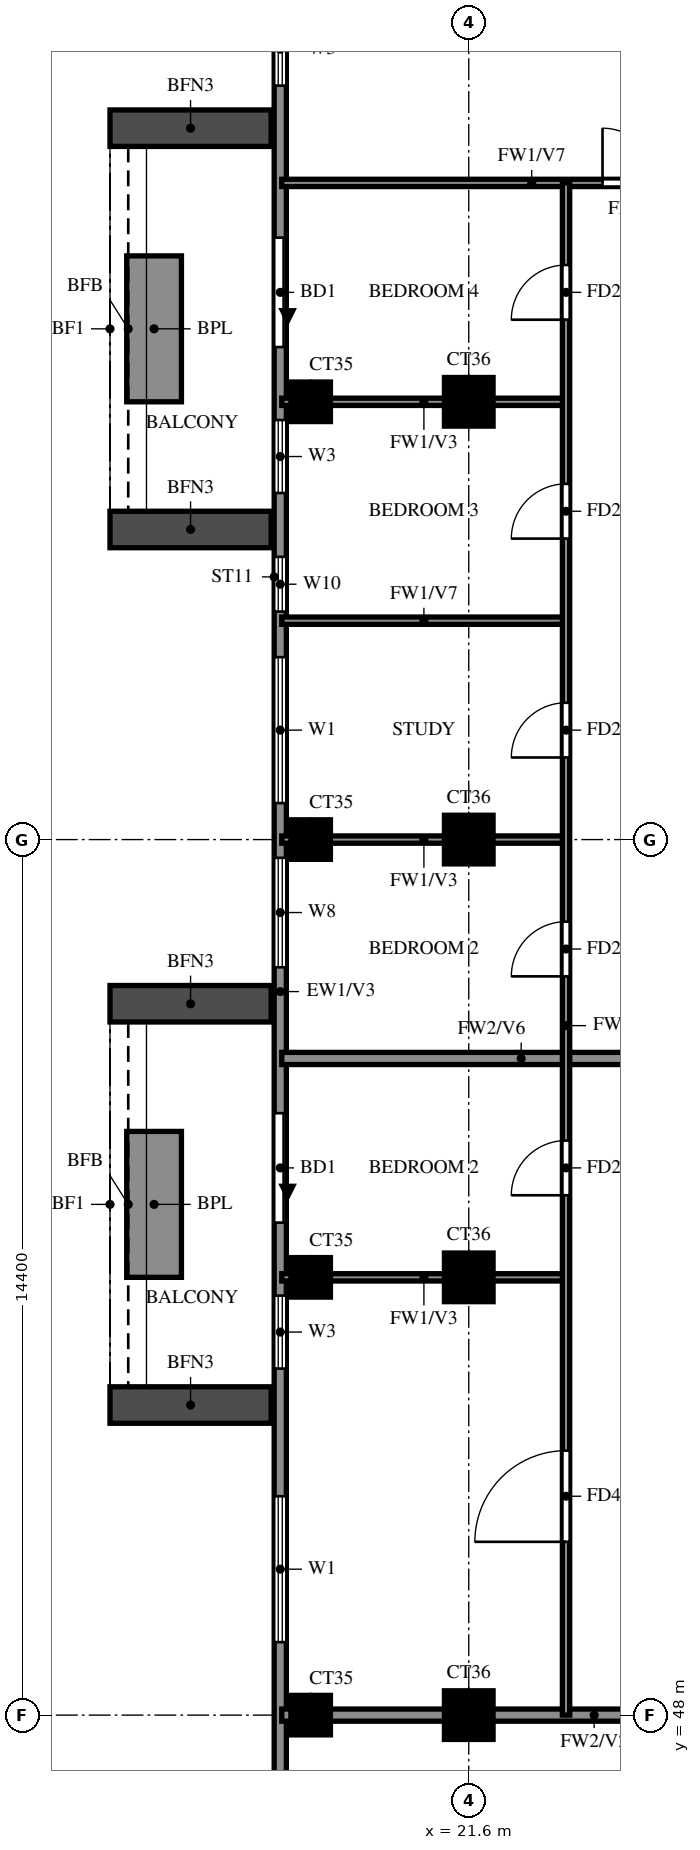
"""IFC4 building model, lengths in metres.
Left out: names, types, materials, properties, quantities, classifications, styles, units other than length and angle.
Written with IfcOpenShell. Run it as: python <this file> out.ifc"""

import sys

from ifc_helpers import new_model, si_unit, direction, frame, frame_2d, origin, origin_2d, place, context, subcontext, project, spatial, rectangle, extrude, source, transform, mapped, element, fill, save


model = new_model("IFC4")
c1 = context("Model", 3, precision=1e-05, world=origin(), true_north=direction((0.0, 1.0)))
c2 = subcontext(c1, "Body", "Model", "MODEL_VIEW")
j1 = project(units=[si_unit("LENGTHUNIT", "METRE"), si_unit("PLANEANGLEUNIT", "RADIAN")], contexts=[c1])
p1 = place(None, origin())
s1 = spatial("IfcSite", under=j1, at=p1, CompositionType="ELEMENT")
p2 = place(p1, origin())
s2 = spatial("IfcBuilding", under=s1, at=p2, CompositionType="ELEMENT")
p3 = place(p2, frame((0.0, 0.0, 239.5)))
s3 = spatial("IfcBuildingStorey", under=s2, at=p3, CompositionType="ELEMENT", Elevation=239.5)
m1 = source(origin(), c2, "Body", "SweptSolid", [
    extrude(rectangle(XDim=0.65, YDim=0.65, at=origin_2d()), origin(), (0.0, 0.0, 1.0), 3.22),
])
p4 = place(p3, frame((19.0, 48.0, 0.0), z_axis=(0.0, 0.0, 1.0), x_axis=(1.0, 0.0, 0.0)))
e1 = element("IfcColumn", 1, at=p4, inside=s3, PredefinedType="COLUMN", context=c2, shape_type="MappedRepresentation", body=[
    mapped(m1, transform((0.0, 0.0, 0.0))),
])
m2 = source(origin(), c2, "Body", "SweptSolid", [
    extrude(rectangle(XDim=0.8, YDim=0.8, at=origin_2d()), origin(), (0.0, 0.0, 1.0), 3.22),
])
p5 = place(p3, frame((21.6, 48.0, 0.0), z_axis=(0.0, 0.0, 1.0), x_axis=(1.0, 0.0, 0.0)))
e2 = element("IfcColumn", 2, at=p5, inside=s3, PredefinedType="COLUMN", context=c2, shape_type="MappedRepresentation", body=[
    mapped(m2, transform((0.0, 0.0, 0.0))),
])
p6 = place(p3, frame((19.0, 55.2, 0.0), z_axis=(0.0, 0.0, 1.0), x_axis=(1.0, 0.0, 0.0)))
e3 = element("IfcColumn", 3, at=p6, inside=s3, PredefinedType="COLUMN", context=c2, shape_type="MappedRepresentation", body=[
    mapped(m1, transform((0.0, 0.0, 0.0))),
])
p7 = place(p3, frame((21.6, 55.2, 0.0), z_axis=(0.0, 0.0, 1.0), x_axis=(1.0, 0.0, 0.0)))
e4 = element("IfcColumn", 4, at=p7, inside=s3, PredefinedType="COLUMN", context=c2, shape_type="MappedRepresentation", body=[
    mapped(m2, transform((0.0, 0.0, 0.0))),
])
p8 = place(p3, frame((19.0, 62.4, 0.0), z_axis=(0.0, 0.0, 1.0), x_axis=(1.0, 0.0, 0.0)))
e5 = element("IfcColumn", 5, at=p8, inside=s3, PredefinedType="COLUMN", context=c2, shape_type="MappedRepresentation", body=[
    mapped(m1, transform((0.0, 0.0, 0.0))),
])
p9 = place(p3, frame((21.6, 62.4, 0.0), z_axis=(0.0, 0.0, 1.0), x_axis=(1.0, 0.0, 0.0)))
e6 = element("IfcColumn", 6, at=p9, inside=s3, PredefinedType="COLUMN", context=c2, shape_type="MappedRepresentation", body=[
    mapped(m2, transform((0.0, 0.0, 0.0))),
])
p10 = place(p3, frame((19.0, 69.6, 0.0), z_axis=(0.0, 0.0, 1.0), x_axis=(1.0, 0.0, 0.0)))
e7 = element("IfcColumn", 7, at=p10, inside=s3, PredefinedType="COLUMN", context=c2, shape_type="MappedRepresentation", body=[
    mapped(m1, transform((0.0, 0.0, 0.0))),
])
p11 = place(p3, frame((21.6, 69.6, 0.0), z_axis=(0.0, 0.0, 1.0), x_axis=(1.0, 0.0, 0.0)))
e8 = element("IfcColumn", 8, at=p11, inside=s3, PredefinedType="COLUMN", context=c2, shape_type="MappedRepresentation", body=[
    mapped(m2, transform((0.0, 0.0, 0.0))),
])
p12 = place(p3, frame((18.5, 76.6, 0.0), z_axis=(0.0, 0.0, 1.0), x_axis=(0.0, -1.0, 0.0)))
e9 = element("IfcWall", 9, at=p12, inside=s3, PredefinedType="SOLIDWALL", context=c2, shape_type="SweptSolid", body=[
    extrude(rectangle(XDim=33.4, YDim=0.2, at=frame_2d((16.7, 0.0))), origin(), (0.0, 0.0, 1.0), 3.22),
])
p13 = place(p12, frame((4.3, 0.0, 0.0)))
e10 = element("IfcOpeningElement", 10, at=p13, cuts=e9, PredefinedType="OPENING", context=c2, shape_type="SweptSolid", body=[
    extrude(rectangle(XDim=1.8, YDim=2.4, at=frame_2d((0.9, 1.2))), frame((0.0, 0.11, 0.0), z_axis=(0.0, -1.0, 0.0), x_axis=(1.0, 0.0, 0.0)), (0.0, 0.0, 1.0), 0.22),
])
p14 = place(p12, frame((18.7, 0.0, 0.0)))
e11 = element("IfcOpeningElement", 11, at=p14, cuts=e9, PredefinedType="OPENING", context=c2, shape_type="SweptSolid", body=[
    extrude(rectangle(XDim=1.8, YDim=2.4, at=frame_2d((0.9, 1.2))), frame((0.0, 0.11, 0.0), z_axis=(0.0, -1.0, 0.0), x_axis=(1.0, 0.0, 0.0)), (0.0, 0.0, 1.0), 0.22),
])
p15 = place(p12, frame((29.7, 0.0, 0.6)))
e12 = element("IfcOpeningElement", 12, at=p15, cuts=e9, PredefinedType="OPENING", context=c2, shape_type="SweptSolid", body=[
    extrude(rectangle(XDim=2.4, YDim=2.4, at=frame_2d((1.2, 1.2))), frame((0.0, 0.11, 0.0), z_axis=(0.0, -1.0, 0.0), x_axis=(1.0, 0.0, 0.0)), (0.0, 0.0, 1.0), 0.22),
])
p16 = place(p12, frame((21.7, 0.0, 0.6)))
e13 = element("IfcOpeningElement", 13, at=p16, cuts=e9, PredefinedType="OPENING", context=c2, shape_type="SweptSolid", body=[
    extrude(rectangle(XDim=1.2, YDim=2.4, at=frame_2d((0.6, 1.2))), frame((0.0, 0.11, 0.0), z_axis=(0.0, -1.0, 0.0), x_axis=(1.0, 0.0, 0.0)), (0.0, 0.0, 1.0), 0.22),
])
p17 = place(p12, frame((25.0, 0.0, 0.6)))
e14 = element("IfcOpeningElement", 14, at=p17, cuts=e9, PredefinedType="OPENING", context=c2, shape_type="SweptSolid", body=[
    extrude(rectangle(XDim=2.4, YDim=2.4, at=frame_2d((1.2, 1.2))), frame((0.0, 0.11, 0.0), z_axis=(0.0, -1.0, 0.0), x_axis=(1.0, 0.0, 0.0)), (0.0, 0.0, 1.0), 0.22),
])
p18 = place(p12, frame((14.5, 0.0, 0.6)))
e15 = element("IfcOpeningElement", 15, at=p18, cuts=e9, PredefinedType="OPENING", context=c2, shape_type="SweptSolid", body=[
    extrude(rectangle(XDim=1.8, YDim=2.4, at=frame_2d((0.9, 1.2))), frame((0.0, 0.11, 0.0), z_axis=(0.0, -1.0, 0.0), x_axis=(1.0, 0.0, 0.0)), (0.0, 0.0, 1.0), 0.22),
])
p19 = place(p12, frame((11.2, 0.0, 0.6)))
e16 = element("IfcOpeningElement", 16, at=p19, cuts=e9, PredefinedType="OPENING", context=c2, shape_type="SweptSolid", body=[
    extrude(rectangle(XDim=2.4, YDim=2.4, at=frame_2d((1.2, 1.2))), frame((0.0, 0.11, 0.0), z_axis=(0.0, -1.0, 0.0), x_axis=(1.0, 0.0, 0.0)), (0.0, 0.0, 1.0), 0.22),
])
p20 = place(p12, frame((7.3, 0.0, 0.6)))
e17 = element("IfcOpeningElement", 17, at=p20, cuts=e9, PredefinedType="OPENING", context=c2, shape_type="SweptSolid", body=[
    extrude(rectangle(XDim=1.2, YDim=2.4, at=frame_2d((0.6, 1.2))), frame((0.0, 0.11, 0.0), z_axis=(0.0, -1.0, 0.0), x_axis=(1.0, 0.0, 0.0)), (0.0, 0.0, 1.0), 0.22),
])
p21 = place(p12, frame((9.55, 0.0, 0.6)))
e18 = element("IfcOpeningElement", 18, at=p21, cuts=e9, PredefinedType="OPENING", context=c2, shape_type="SweptSolid", body=[
    extrude(rectangle(XDim=0.9, YDim=2.4, at=frame_2d((0.45, 1.2))), frame((0.0, 0.11, 0.0), z_axis=(0.0, -1.0, 0.0), x_axis=(1.0, 0.0, 0.0)), (0.0, 0.0, 1.0), 0.22),
])
p22 = place(p12, frame((0.6, 0.0, 0.6)))
e19 = element("IfcOpeningElement", 19, at=p22, cuts=e9, PredefinedType="OPENING", context=c2, shape_type="SweptSolid", body=[
    extrude(rectangle(XDim=1.2, YDim=2.4, at=frame_2d((0.6, 1.2))), frame((0.0, 0.11, 0.0), z_axis=(0.0, -1.0, 0.0), x_axis=(1.0, 0.0, 0.0)), (0.0, 0.0, 1.0), 0.22),
])
for number, where, z_axis, x_axis in (
    (20, (18.35, 74.1, 0.0), (0.0, 0.0, 1.0), (-1.0, 0.0, 0.0)),
    (21, (18.35, 67.5, 0.0), (0.0, 0.0, 1.0), (-1.0, 0.0, 0.0)),
):
    element("IfcWall", number, at=place(p3, frame(where, z_axis=z_axis, x_axis=x_axis)), inside=s3, PredefinedType="SOLIDWALL", context=c2, shape_type="SweptSolid", body=[
        extrude(rectangle(XDim=2.65, YDim=0.6, at=frame_2d((1.325, 0.0))), origin(), (0.0, 0.0, 1.0), 2.85),
    ])
p23 = place(p3, frame((16.425, 72.0, 0.0), z_axis=(0.0, 0.0, 1.0), x_axis=(0.0, -1.0, 0.0)))
e22 = element("IfcWall", 22, at=p23, inside=s3, PredefinedType="SOLIDWALL", context=c2, shape_type="SweptSolid", body=[
    extrude(rectangle(XDim=2.4, YDim=0.9, at=frame_2d((1.2, 0.0))), origin(), (0.0, 0.0, 1.0), 0.9),
])
for number, where, z_axis, x_axis in (
    (23, (18.35, 59.7, 0.0), (0.0, 0.0, 1.0), (-1.0, 0.0, 0.0)),
    (24, (18.35, 53.1, 0.0), (0.0, 0.0, 1.0), (-1.0, 0.0, 0.0)),
):
    element("IfcWall", number, at=place(p3, frame(where, z_axis=z_axis, x_axis=x_axis)), inside=s3, PredefinedType="SOLIDWALL", context=c2, shape_type="SweptSolid", body=[
        extrude(rectangle(XDim=2.65, YDim=0.6, at=frame_2d((1.325, 0.0))), origin(), (0.0, 0.0, 1.0), 2.85),
    ])
p24 = place(p3, frame((16.425, 57.6, 0.0), z_axis=(0.0, 0.0, 1.0), x_axis=(0.0, -1.0, 0.0)))
e25 = element("IfcWall", 25, at=p24, inside=s3, PredefinedType="SOLIDWALL", context=c2, shape_type="SweptSolid", body=[
    extrude(rectangle(XDim=2.4, YDim=0.9, at=frame_2d((1.2, 0.0))), origin(), (0.0, 0.0, 1.0), 0.9),
])
p25 = place(p3, frame((18.525, 48.0, 0.0), z_axis=(0.0, 0.0, 1.0), x_axis=(1.0, 0.0, 0.0)))
e26 = element("IfcWall", 26, at=p25, inside=s3, PredefinedType="SOLIDWALL", context=c2, shape_type="SweptSolid", body=[
    extrude(rectangle(XDim=10.275, YDim=0.2, at=frame_2d((5.138, 0.0))), origin(), (0.0, 0.0, 1.0), 3.22),
])
p26 = place(p3, frame((18.525, 58.8, 0.0), z_axis=(0.0, 0.0, 1.0), x_axis=(1.0, 0.0, 0.0)))
e27 = element("IfcWall", 27, at=p26, inside=s3, PredefinedType="SOLIDWALL", context=c2, shape_type="SweptSolid", body=[
    extrude(rectangle(XDim=7.875, YDim=0.2, at=frame_2d((3.938, 0.0))), origin(), (0.0, 0.0, 1.0), 2.32),
])
for number, where, z_axis, x_axis in (
    (28, (18.525, 55.2, 0.0), (0.0, 0.0, 1.0), (1.0, 0.0, 0.0)),
    (29, (18.525, 62.4, 0.0), (0.0, 0.0, 1.0), (1.0, 0.0, 0.0)),
):
    element("IfcWall", number, at=place(p3, frame(where, z_axis=z_axis, x_axis=x_axis)), inside=s3, PredefinedType="PARTITIONING", context=c2, shape_type="SweptSolid", body=[
        extrude(rectangle(XDim=4.675, YDim=0.12, at=frame_2d((2.337, 0.0))), origin(), (0.0, 0.0, 1.0), 3.22),
    ])
p27 = place(p3, frame((18.525, 66.0, 0.0), z_axis=(0.0, 0.0, 1.0), x_axis=(1.0, 0.0, 0.0)))
e30 = element("IfcWall", 30, at=p27, inside=s3, PredefinedType="PARTITIONING", context=c2, shape_type="SweptSolid", body=[
    extrude(rectangle(XDim=4.675, YDim=0.12, at=frame_2d((2.337, 0.0))), origin(), (0.0, 0.0, 1.0), 2.32),
])
p28 = place(p3, frame((18.525, 69.6, 0.0), z_axis=(0.0, 0.0, 1.0), x_axis=(1.0, 0.0, 0.0)))
e31 = element("IfcWall", 31, at=p28, inside=s3, PredefinedType="PARTITIONING", context=c2, shape_type="SweptSolid", body=[
    extrude(rectangle(XDim=4.675, YDim=0.12, at=frame_2d((2.337, 0.0))), origin(), (0.0, 0.0, 1.0), 3.22),
])
p29 = place(p3, frame((18.525, 73.2, 0.0), z_axis=(0.0, 0.0, 1.0), x_axis=(1.0, 0.0, 0.0)))
e32 = element("IfcWall", 32, at=p29, inside=s3, PredefinedType="PARTITIONING", context=c2, shape_type="SweptSolid", body=[
    extrude(rectangle(XDim=10.275, YDim=0.12, at=frame_2d((5.138, 0.0))), origin(), (0.0, 0.0, 1.0), 2.32),
])
p30 = place(p29, frame((5.275, 0.0, 0.0)))
e33 = element("IfcOpeningElement", 33, at=p30, cuts=e32, PredefinedType="OPENING", context=c2, shape_type="SweptSolid", body=[
    extrude(rectangle(XDim=0.9, YDim=2.1, at=frame_2d((0.45, 1.05))), frame((0.0, 0.07, 0.0), z_axis=(0.0, -1.0, 0.0), x_axis=(1.0, 0.0, 0.0)), (0.0, 0.0, 1.0), 0.14),
])
p31 = place(p3, frame((23.2, 48.0, 0.0), z_axis=(0.0, 0.0, 1.0), x_axis=(0.0, 1.0, 0.0)))
e34 = element("IfcWall", 34, at=p31, inside=s3, PredefinedType="PARTITIONING", context=c2, shape_type="SweptSolid", body=[
    extrude(rectangle(XDim=25.2, YDim=0.12, at=frame_2d((12.6, 0.0))), origin(), (0.0, 0.0, 1.0), 3.22),
])
p32 = place(p31, frame((2.85, 0.0, 0.0)))
e35 = element("IfcOpeningElement", 35, at=p32, cuts=e34, PredefinedType="OPENING", context=c2, shape_type="SweptSolid", body=[
    extrude(rectangle(XDim=1.5, YDim=2.1, at=frame_2d((0.75, 1.05))), frame((0.0, 0.07, 0.0), z_axis=(0.0, -1.0, 0.0), x_axis=(1.0, 0.0, 0.0)), (0.0, 0.0, 1.0), 0.14),
])
p33 = place(p31, frame((8.55, 0.0, 0.0)))
e36 = element("IfcOpeningElement", 36, at=p33, cuts=e34, PredefinedType="OPENING", context=c2, shape_type="SweptSolid", body=[
    extrude(rectangle(XDim=0.9, YDim=2.1, at=frame_2d((0.45, 1.05))), frame((0.0, 0.07, 0.0), z_axis=(0.0, -1.0, 0.0), x_axis=(1.0, 0.0, 0.0)), (0.0, 0.0, 1.0), 0.14),
])
p34 = place(p31, frame((12.15, 0.0, 0.0)))
e37 = element("IfcOpeningElement", 37, at=p34, cuts=e34, PredefinedType="OPENING", context=c2, shape_type="SweptSolid", body=[
    extrude(rectangle(XDim=0.9, YDim=2.1, at=frame_2d((0.45, 1.05))), frame((0.0, 0.07, 0.0), z_axis=(0.0, -1.0, 0.0), x_axis=(1.0, 0.0, 0.0)), (0.0, 0.0, 1.0), 0.14),
])
p35 = place(p31, frame((15.75, 0.0, 0.0)))
e38 = element("IfcOpeningElement", 38, at=p35, cuts=e34, PredefinedType="OPENING", context=c2, shape_type="SweptSolid", body=[
    extrude(rectangle(XDim=0.9, YDim=2.1, at=frame_2d((0.45, 1.05))), frame((0.0, 0.07, 0.0), z_axis=(0.0, -1.0, 0.0), x_axis=(1.0, 0.0, 0.0)), (0.0, 0.0, 1.0), 0.14),
])
p36 = place(p31, frame((19.35, 0.0, 0.0)))
e39 = element("IfcOpeningElement", 39, at=p36, cuts=e34, PredefinedType="OPENING", context=c2, shape_type="SweptSolid", body=[
    extrude(rectangle(XDim=0.9, YDim=2.1, at=frame_2d((0.45, 1.05))), frame((0.0, 0.07, 0.0), z_axis=(0.0, -1.0, 0.0), x_axis=(1.0, 0.0, 0.0)), (0.0, 0.0, 1.0), 0.14),
])
p37 = place(p31, frame((22.95, 0.0, 0.0)))
e40 = element("IfcOpeningElement", 40, at=p37, cuts=e34, PredefinedType="OPENING", context=c2, shape_type="SweptSolid", body=[
    extrude(rectangle(XDim=0.9, YDim=2.1, at=frame_2d((0.45, 1.05))), frame((0.0, 0.07, 0.0), z_axis=(0.0, -1.0, 0.0), x_axis=(1.0, 0.0, 0.0)), (0.0, 0.0, 1.0), 0.14),
])
p38 = place(p13, origin())
e41 = element("IfcDoor", 41, at=p38, inside=s3, OperationType="DOUBLE_DOOR_SLIDING", PredefinedType="DOOR", context=c2, shape_type="SweptSolid", body=[
    extrude(rectangle(XDim=1.8, YDim=2.4, at=frame_2d((0.9, 1.2))), frame((0.0, 0.025, 0.0), z_axis=(0.0, -1.0, 0.0), x_axis=(1.0, 0.0, 0.0)), (0.0, 0.0, 1.0), 0.05),
])
fill(e10, e41)
p39 = place(p14, origin())
e42 = element("IfcDoor", 42, at=p39, inside=s3, OperationType="DOUBLE_DOOR_SLIDING", PredefinedType="DOOR", context=c2, shape_type="SweptSolid", body=[
    extrude(rectangle(XDim=1.8, YDim=2.4, at=frame_2d((0.9, 1.2))), frame((0.0, 0.025, 0.0), z_axis=(0.0, -1.0, 0.0), x_axis=(1.0, 0.0, 0.0)), (0.0, 0.0, 1.0), 0.05),
])
fill(e11, e42)
p40 = place(p16, origin())
e43 = element("IfcWindow", 43, at=p40, inside=s3, PartitioningType="SINGLE_PANEL", PredefinedType="WINDOW", context=c2, shape_type="SweptSolid", body=[
    extrude(rectangle(XDim=1.2, YDim=2.4, at=frame_2d((0.6, 1.2))), frame((0.0, 0.03, 0.0), z_axis=(0.0, -1.0, 0.0), x_axis=(1.0, 0.0, 0.0)), (0.0, 0.0, 1.0), 0.06),
])
fill(e13, e43)
p41 = place(p17, origin())
e44 = element("IfcWindow", 44, at=p41, inside=s3, PartitioningType="DOUBLE_PANEL_VERTICAL", PredefinedType="WINDOW", context=c2, shape_type="SweptSolid", body=[
    extrude(rectangle(XDim=2.4, YDim=2.4, at=frame_2d((1.2, 1.2))), frame((0.0, 0.03, 0.0), z_axis=(0.0, -1.0, 0.0), x_axis=(1.0, 0.0, 0.0)), (0.0, 0.0, 1.0), 0.06),
])
fill(e14, e44)
p42 = place(p18, origin())
e45 = element("IfcWindow", 45, at=p42, inside=s3, PartitioningType="DOUBLE_PANEL_VERTICAL", PredefinedType="WINDOW", context=c2, shape_type="SweptSolid", body=[
    extrude(rectangle(XDim=1.8, YDim=2.4, at=frame_2d((0.9, 1.2))), frame((0.0, 0.03, 0.0), z_axis=(0.0, -1.0, 0.0), x_axis=(1.0, 0.0, 0.0)), (0.0, 0.0, 1.0), 0.06),
])
fill(e15, e45)
p43 = place(p19, origin())
e46 = element("IfcWindow", 46, at=p43, inside=s3, PartitioningType="DOUBLE_PANEL_VERTICAL", PredefinedType="WINDOW", context=c2, shape_type="SweptSolid", body=[
    extrude(rectangle(XDim=2.4, YDim=2.4, at=frame_2d((1.2, 1.2))), frame((0.0, 0.03, 0.0), z_axis=(0.0, -1.0, 0.0), x_axis=(1.0, 0.0, 0.0)), (0.0, 0.0, 1.0), 0.06),
])
fill(e16, e46)
p44 = place(p20, origin())
e47 = element("IfcWindow", 47, at=p44, inside=s3, PartitioningType="SINGLE_PANEL", PredefinedType="WINDOW", context=c2, shape_type="SweptSolid", body=[
    extrude(rectangle(XDim=1.2, YDim=2.4, at=frame_2d((0.6, 1.2))), frame((0.0, 0.03, 0.0), z_axis=(0.0, -1.0, 0.0), x_axis=(1.0, 0.0, 0.0)), (0.0, 0.0, 1.0), 0.06),
])
fill(e17, e47)
p45 = place(p21, origin())
e48 = element("IfcWindow", 48, at=p45, inside=s3, PartitioningType="SINGLE_PANEL", PredefinedType="WINDOW", context=c2, shape_type="SweptSolid", body=[
    extrude(rectangle(XDim=0.9, YDim=2.4, at=frame_2d((0.45, 1.2))), frame((0.0, 0.03, 0.0), z_axis=(0.0, -1.0, 0.0), x_axis=(1.0, 0.0, 0.0)), (0.0, 0.0, 1.0), 0.06),
])
fill(e18, e48)
p46 = place(p22, origin())
e49 = element("IfcWindow", 49, at=p46, inside=s3, PartitioningType="SINGLE_PANEL", PredefinedType="WINDOW", context=c2, shape_type="SweptSolid", body=[
    extrude(rectangle(XDim=1.2, YDim=2.4, at=frame_2d((0.6, 1.2))), frame((0.0, 0.03, 0.0), z_axis=(0.0, -1.0, 0.0), x_axis=(1.0, 0.0, 0.0)), (0.0, 0.0, 1.0), 0.06),
])
fill(e19, e49)
p47 = place(p32, origin())
e50 = element("IfcDoor", 50, at=p47, inside=s3, OperationType="SINGLE_SWING_RIGHT", PredefinedType="DOOR", context=c2, shape_type="SweptSolid", body=[
    extrude(rectangle(XDim=1.5, YDim=2.1, at=frame_2d((0.75, 1.05))), frame((0.0, 0.025, 0.0), z_axis=(0.0, -1.0, 0.0), x_axis=(1.0, 0.0, 0.0)), (0.0, 0.0, 1.0), 0.05),
])
fill(e35, e50)
p48 = place(p33, origin())
e51 = element("IfcDoor", 51, at=p48, inside=s3, OperationType="SINGLE_SWING_LEFT", PredefinedType="DOOR", context=c2, shape_type="SweptSolid", body=[
    extrude(rectangle(XDim=0.9, YDim=2.1, at=frame_2d((0.45, 1.05))), frame((0.0, 0.025, 0.0), z_axis=(0.0, -1.0, 0.0), x_axis=(1.0, 0.0, 0.0)), (0.0, 0.0, 1.0), 0.05),
])
fill(e36, e51)
p49 = place(p34, origin())
e52 = element("IfcDoor", 52, at=p49, inside=s3, OperationType="SINGLE_SWING_LEFT", PredefinedType="DOOR", context=c2, shape_type="SweptSolid", body=[
    extrude(rectangle(XDim=0.9, YDim=2.1, at=frame_2d((0.45, 1.05))), frame((0.0, 0.025, 0.0), z_axis=(0.0, -1.0, 0.0), x_axis=(1.0, 0.0, 0.0)), (0.0, 0.0, 1.0), 0.05),
])
fill(e37, e52)
p50 = place(p35, origin())
e53 = element("IfcDoor", 53, at=p50, inside=s3, OperationType="SINGLE_SWING_LEFT", PredefinedType="DOOR", context=c2, shape_type="SweptSolid", body=[
    extrude(rectangle(XDim=0.9, YDim=2.1, at=frame_2d((0.45, 1.05))), frame((0.0, 0.025, 0.0), z_axis=(0.0, -1.0, 0.0), x_axis=(1.0, 0.0, 0.0)), (0.0, 0.0, 1.0), 0.05),
])
fill(e38, e53)
p51 = place(p36, origin())
e54 = element("IfcDoor", 54, at=p51, inside=s3, OperationType="SINGLE_SWING_RIGHT", PredefinedType="DOOR", context=c2, shape_type="SweptSolid", body=[
    extrude(rectangle(XDim=0.9, YDim=2.1, at=frame_2d((0.45, 1.05))), frame((0.0, 0.025, 0.0), z_axis=(0.0, -1.0, 0.0), x_axis=(1.0, 0.0, 0.0)), (0.0, 0.0, 1.0), 0.05),
])
fill(e39, e54)
p52 = place(p37, origin())
e55 = element("IfcDoor", 55, at=p52, inside=s3, OperationType="SINGLE_SWING_LEFT", PredefinedType="DOOR", context=c2, shape_type="SweptSolid", body=[
    extrude(rectangle(XDim=0.9, YDim=2.1, at=frame_2d((0.45, 1.05))), frame((0.0, 0.025, 0.0), z_axis=(0.0, -1.0, 0.0), x_axis=(1.0, 0.0, 0.0)), (0.0, 0.0, 1.0), 0.05),
])
fill(e40, e55)
p53 = place(p30, origin())
e56 = element("IfcDoor", 56, at=p53, inside=s3, OperationType="SINGLE_SWING_LEFT", PredefinedType="DOOR", context=c2, shape_type="SweptSolid", body=[
    extrude(rectangle(XDim=0.9, YDim=2.1, at=frame_2d((0.45, 1.05))), frame((0.0, 0.025, 0.0), z_axis=(0.0, -1.0, 0.0), x_axis=(1.0, 0.0, 0.0)), (0.0, 0.0, 1.0), 0.05),
])
fill(e33, e56)
save(model, sys.argv[1])
